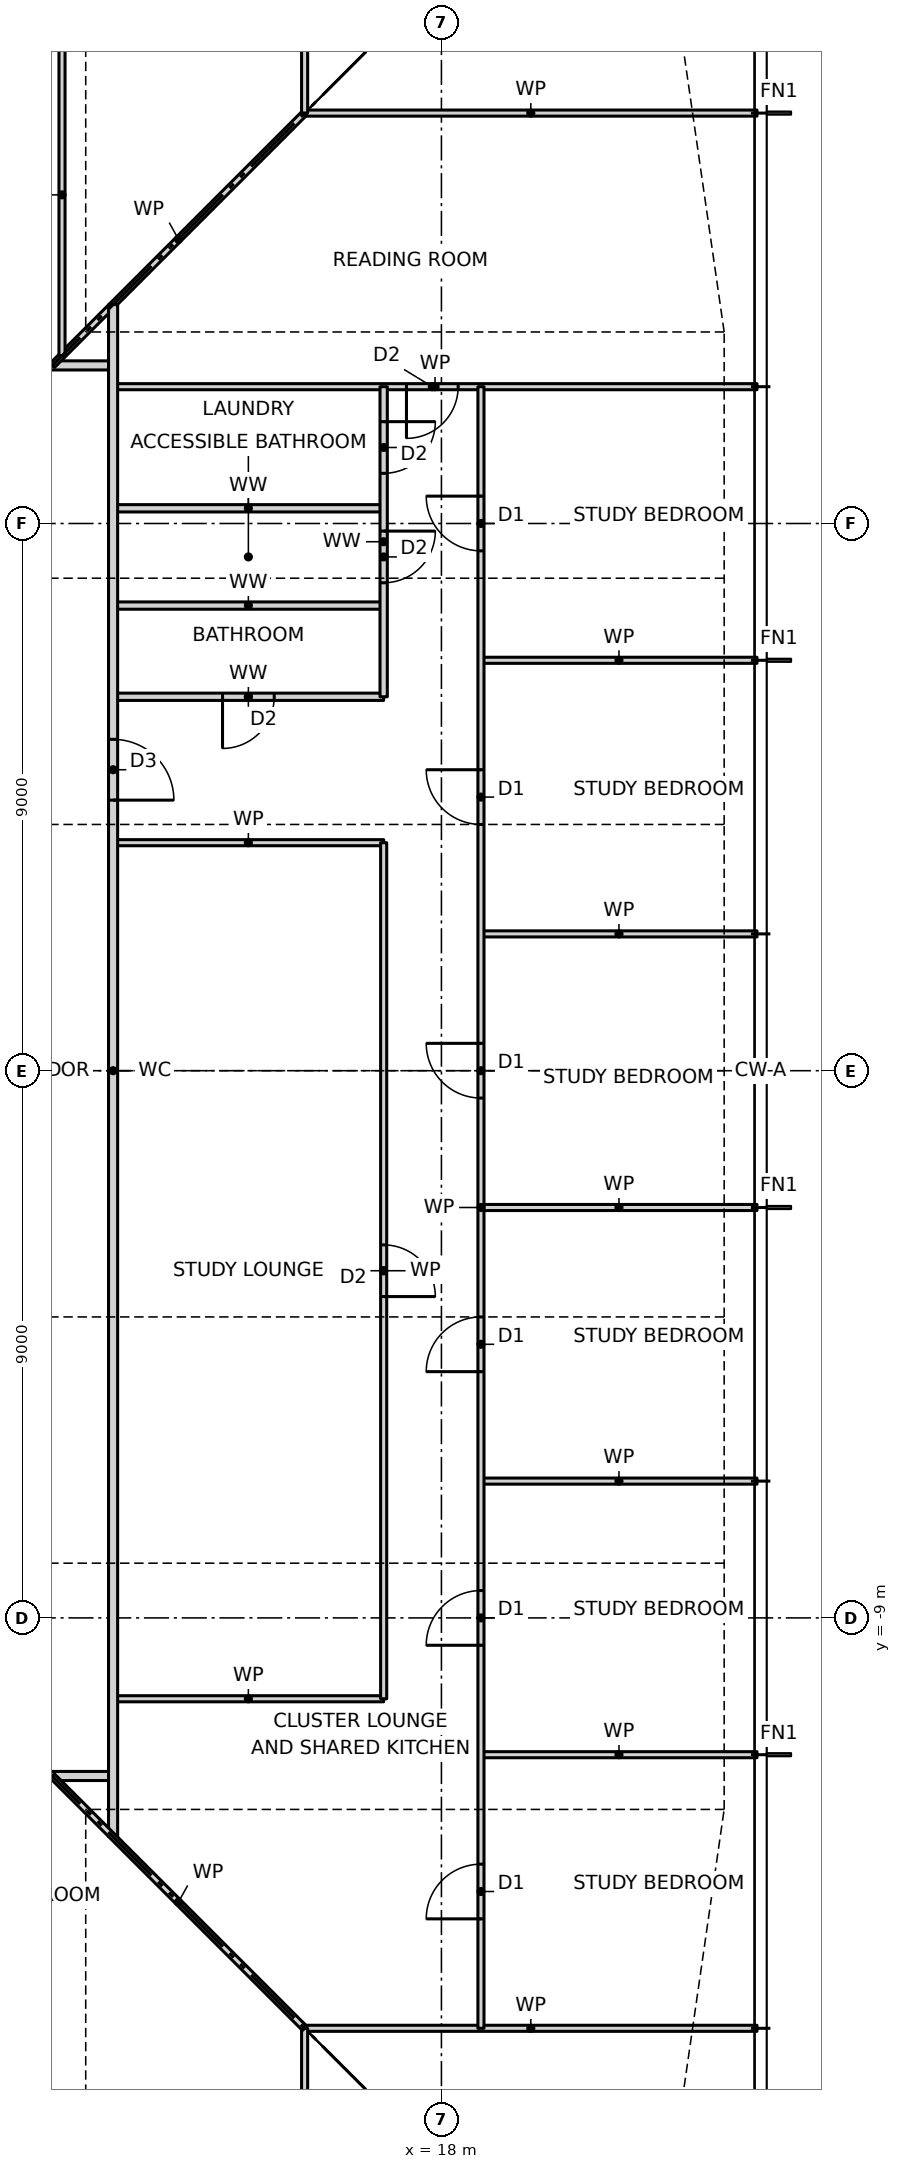
"""IFC4 building model, lengths in metres.
Left out: names, types, materials, properties, quantities, classifications, styles, units other than length and angle.
Written with IfcOpenShell. Run it as: python <this file> out.ifc"""

import sys

from ifc_helpers import new_model, si_unit, direction, frame, frame_2d, origin, place, context, subcontext, project, spatial, rectangle, extrude, element, fill, save


model = new_model("IFC4")
c1 = context("Model", 3, precision=1e-05, world=origin(), true_north=direction((0.0, 1.0)))
c2 = subcontext(c1, "Body", "Model", "MODEL_VIEW")
j1 = project(units=[si_unit("LENGTHUNIT", "METRE"), si_unit("PLANEANGLEUNIT", "RADIAN")], contexts=[c1])
p1 = place(None, origin())
s1 = spatial("IfcSite", under=j1, at=p1, CompositionType="ELEMENT")
p2 = place(p1, origin())
s2 = spatial("IfcBuilding", under=s1, at=p2, CompositionType="ELEMENT")
p3 = place(p2, frame((0.0, 0.0, 71.0)))
s3 = spatial("IfcBuildingStorey", under=s2, at=p3, CompositionType="ELEMENT", Elevation=71.0)
p4 = place(p3, frame((15.75, -15.75, 0.0), z_axis=(0.0, 0.0, 1.0), x_axis=(1.0, 0.0, 0.0)))
e1 = element("IfcWall", 1, at=p4, inside=s3, PredefinedType="PARTITIONING", context=c2, shape_type="SweptSolid", body=[
    extrude(rectangle(XDim=7.44, YDim=0.1, at=frame_2d((3.72, 0.0))), origin(), (0.0, 0.0, 1.0), 3.2),
])
p5 = place(p3, frame((-11.6, -11.6, 0.0), z_axis=(0.0, 0.0, 1.0), x_axis=(1.0, 0.0, 0.0)))
e2 = element("IfcWall", 2, at=p5, inside=s3, PredefinedType="PARTITIONING", context=c2, shape_type="SweptSolid", body=[
    extrude(rectangle(XDim=24.2, YDim=0.15, at=frame_2d((12.1, 0.0))), origin(), (0.0, 0.0, 1.0), 3.2),
])
p6 = place(p5, frame((0.74, 0.0, 0.0)))
e3 = element("IfcOpeningElement", 3, at=p6, cuts=e2, PredefinedType="OPENING", context=c2, shape_type="SweptSolid", body=[
    extrude(rectangle(XDim=1.0, YDim=2.1, at=frame_2d((0.5, 1.05))), frame((0.0, 0.085, 0.0), z_axis=(0.0, -1.0, 0.0), x_axis=(1.0, 0.0, 0.0)), (0.0, 0.0, 1.0), 0.17),
])
p7 = place(p5, frame((21.025, 0.0, 0.0)))
e4 = element("IfcOpeningElement", 4, at=p7, cuts=e2, PredefinedType="OPENING", context=c2, shape_type="SweptSolid", body=[
    extrude(rectangle(XDim=1.0, YDim=2.1, at=frame_2d((0.5, 1.05))), frame((0.0, 0.085, 0.0), z_axis=(0.0, -1.0, 0.0), x_axis=(1.0, 0.0, 0.0)), (0.0, 0.0, 1.0), 0.17),
])
p8 = place(p3, frame((18.65, -11.25, 0.0), z_axis=(0.0, 0.0, 1.0), x_axis=(1.0, 0.0, 0.0)))
e5 = element("IfcWall", 5, at=p8, inside=s3, PredefinedType="PARTITIONING", context=c2, shape_type="SweptSolid", body=[
    extrude(rectangle(XDim=4.54, YDim=0.1, at=frame_2d((2.27, 0.0))), origin(), (0.0, 0.0, 1.0), 3.2),
])
p9 = place(p3, frame((12.6, -10.33, 0.0), z_axis=(0.0, 0.0, 1.0), x_axis=(1.0, 0.0, 0.0)))
e6 = element("IfcWall", 6, at=p9, inside=s3, PredefinedType="PARTITIONING", context=c2, shape_type="SweptSolid", body=[
    extrude(rectangle(XDim=4.45, YDim=0.1, at=frame_2d((2.225, 0.0))), origin(), (0.0, 0.0, 1.0), 3.2),
])
for number, where, z_axis, x_axis in (
    (7, (18.65, -6.75, 0.0), (0.0, 0.0, 1.0), (1.0, 0.0, 0.0)),
    (8, (18.65, -2.25, 0.0), (0.0, 0.0, 1.0), (1.0, 0.0, 0.0)),
    (9, (18.65, 2.25, 0.0), (0.0, 0.0, 1.0), (1.0, 0.0, 0.0)),
):
    element("IfcWall", number, at=place(p3, frame(where, z_axis=z_axis, x_axis=x_axis)), inside=s3, PredefinedType="PARTITIONING", context=c2, shape_type="SweptSolid", body=[
        extrude(rectangle(XDim=4.54, YDim=0.1, at=frame_2d((2.27, 0.0))), origin(), (0.0, 0.0, 1.0), 3.2),
    ])
p10 = place(p3, frame((12.6, 3.75, 0.0), z_axis=(0.0, 0.0, 1.0), x_axis=(1.0, 0.0, 0.0)))
e10 = element("IfcWall", 10, at=p10, inside=s3, PredefinedType="PARTITIONING", context=c2, shape_type="SweptSolid", body=[
    extrude(rectangle(XDim=4.45, YDim=0.1, at=frame_2d((2.225, 0.0))), origin(), (0.0, 0.0, 1.0), 3.2),
])
p11 = place(p3, frame((12.6, 6.15, 0.0), z_axis=(0.0, 0.0, 1.0), x_axis=(1.0, 0.0, 0.0)))
e11 = element("IfcWall", 11, at=p11, inside=s3, PredefinedType="PARTITIONING", context=c2, shape_type="SweptSolid", body=[
    extrude(rectangle(XDim=4.45, YDim=0.12, at=frame_2d((2.225, 0.0))), origin(), (0.0, 0.0, 1.0), 3.2),
])
p12 = place(p11, frame((1.8, 0.0, 0.0)))
e12 = element("IfcOpeningElement", 12, at=p12, cuts=e11, PredefinedType="OPENING", context=c2, shape_type="SweptSolid", body=[
    extrude(rectangle(XDim=0.85, YDim=2.1, at=frame_2d((0.425, 1.05))), frame((0.0, 0.07, 0.0), z_axis=(0.0, -1.0, 0.0), x_axis=(1.0, 0.0, 0.0)), (0.0, 0.0, 1.0), 0.14),
])
p13 = place(p3, frame((18.65, 6.75, 0.0), z_axis=(0.0, 0.0, 1.0), x_axis=(1.0, 0.0, 0.0)))
e13 = element("IfcWall", 13, at=p13, inside=s3, PredefinedType="PARTITIONING", context=c2, shape_type="SweptSolid", body=[
    extrude(rectangle(XDim=4.54, YDim=0.1, at=frame_2d((2.27, 0.0))), origin(), (0.0, 0.0, 1.0), 3.2),
])
for number, where, z_axis, x_axis in (
    (14, (12.6, 7.65, 0.0), (0.0, 0.0, 1.0), (1.0, 0.0, 0.0)),
    (15, (12.6, 9.25, 0.0), (0.0, 0.0, 1.0), (1.0, 0.0, 0.0)),
):
    element("IfcWall", number, at=place(p3, frame(where, z_axis=z_axis, x_axis=x_axis)), inside=s3, PredefinedType="PARTITIONING", context=c2, shape_type="SweptSolid", body=[
        extrude(rectangle(XDim=4.45, YDim=0.12, at=frame_2d((2.225, 0.0))), origin(), (0.0, 0.0, 1.0), 3.2),
    ])
p14 = place(p3, frame((12.6, 11.25, 0.0), z_axis=(0.0, 0.0, 1.0), x_axis=(1.0, 0.0, 0.0)))
e16 = element("IfcWall", 16, at=p14, inside=s3, PredefinedType="PARTITIONING", context=c2, shape_type="SweptSolid", body=[
    extrude(rectangle(XDim=10.59, YDim=0.1, at=frame_2d((5.295, 0.0))), origin(), (0.0, 0.0, 1.0), 3.2),
])
p15 = place(p14, frame((4.825, 0.0, 0.0)))
e17 = element("IfcOpeningElement", 17, at=p15, cuts=e16, PredefinedType="OPENING", context=c2, shape_type="SweptSolid", body=[
    extrude(rectangle(XDim=0.85, YDim=2.1, at=frame_2d((0.425, 1.05))), frame((0.0, 0.06, 0.0), z_axis=(0.0, -1.0, 0.0), x_axis=(1.0, 0.0, 0.0)), (0.0, 0.0, 1.0), 0.12),
])
p16 = place(p3, frame((-11.6, 11.6, 0.0), z_axis=(0.0, 0.0, 1.0), x_axis=(1.0, 0.0, 0.0)))
e18 = element("IfcWall", 18, at=p16, inside=s3, PredefinedType="PARTITIONING", context=c2, shape_type="SweptSolid", body=[
    extrude(rectangle(XDim=24.2, YDim=0.15, at=frame_2d((12.1, 0.0))), origin(), (0.0, 0.0, 1.0), 3.2),
])
p17 = place(p16, frame((6.15, 0.0, 0.0)))
e19 = element("IfcOpeningElement", 19, at=p17, cuts=e18, PredefinedType="OPENING", context=c2, shape_type="SweptSolid", body=[
    extrude(rectangle(XDim=1.0, YDim=2.1, at=frame_2d((0.5, 1.05))), frame((0.0, 0.085, 0.0), z_axis=(0.0, -1.0, 0.0), x_axis=(1.0, 0.0, 0.0)), (0.0, 0.0, 1.0), 0.17),
])
p18 = place(p3, frame((15.75, 15.75, 0.0), z_axis=(0.0, 0.0, 1.0), x_axis=(1.0, 0.0, 0.0)))
e20 = element("IfcWall", 20, at=p18, inside=s3, PredefinedType="PARTITIONING", context=c2, shape_type="SweptSolid", body=[
    extrude(rectangle(XDim=7.44, YDim=0.1, at=frame_2d((3.72, 0.0))), origin(), (0.0, 0.0, 1.0), 3.2),
])
p19 = place(p3, frame((11.6, 11.6, 0.0), z_axis=(0.0, 0.0, 1.0), x_axis=(0.707106781187, 0.707106781187, 0.0)))
e21 = element("IfcWall", 21, at=p19, inside=s3, PredefinedType="PARTITIONING", context=c2, shape_type="SweptSolid", body=[
    extrude(rectangle(XDim=5.869, YDim=0.1, at=frame_2d((2.935, 0.0))), origin(), (0.0, 0.0, 1.0), 3.2),
])
p20 = place(p3, frame((18.65, -15.75, 0.0), z_axis=(0.0, 0.0, 1.0), x_axis=(0.0, 1.0, 0.0)))
e22 = element("IfcWall", 22, at=p20, inside=s3, PredefinedType="PARTITIONING", context=c2, shape_type="SweptSolid", body=[
    extrude(rectangle(XDim=27.0, YDim=0.1, at=frame_2d((13.5, 0.0))), origin(), (0.0, 0.0, 1.0), 3.2),
])
p21 = place(p20, frame((1.8, 0.0, 0.0)))
e23 = element("IfcOpeningElement", 23, at=p21, cuts=e22, PredefinedType="OPENING", context=c2, shape_type="SweptSolid", body=[
    extrude(rectangle(XDim=0.9, YDim=2.1, at=frame_2d((0.45, 1.05))), frame((0.0, 0.06, 0.0), z_axis=(0.0, -1.0, 0.0), x_axis=(1.0, 0.0, 0.0)), (0.0, 0.0, 1.0), 0.12),
])
p22 = place(p20, frame((6.3, 0.0, 0.0)))
e24 = element("IfcOpeningElement", 24, at=p22, cuts=e22, PredefinedType="OPENING", context=c2, shape_type="SweptSolid", body=[
    extrude(rectangle(XDim=0.9, YDim=2.1, at=frame_2d((0.45, 1.05))), frame((0.0, 0.06, 0.0), z_axis=(0.0, -1.0, 0.0), x_axis=(1.0, 0.0, 0.0)), (0.0, 0.0, 1.0), 0.12),
])
p23 = place(p20, frame((10.8, 0.0, 0.0)))
e25 = element("IfcOpeningElement", 25, at=p23, cuts=e22, PredefinedType="OPENING", context=c2, shape_type="SweptSolid", body=[
    extrude(rectangle(XDim=0.9, YDim=2.1, at=frame_2d((0.45, 1.05))), frame((0.0, 0.06, 0.0), z_axis=(0.0, -1.0, 0.0), x_axis=(1.0, 0.0, 0.0)), (0.0, 0.0, 1.0), 0.12),
])
p24 = place(p20, frame((15.3, 0.0, 0.0)))
e26 = element("IfcOpeningElement", 26, at=p24, cuts=e22, PredefinedType="OPENING", context=c2, shape_type="SweptSolid", body=[
    extrude(rectangle(XDim=0.9, YDim=2.1, at=frame_2d((0.45, 1.05))), frame((0.0, 0.06, 0.0), z_axis=(0.0, -1.0, 0.0), x_axis=(1.0, 0.0, 0.0)), (0.0, 0.0, 1.0), 0.12),
])
p25 = place(p20, frame((19.8, 0.0, 0.0)))
e27 = element("IfcOpeningElement", 27, at=p25, cuts=e22, PredefinedType="OPENING", context=c2, shape_type="SweptSolid", body=[
    extrude(rectangle(XDim=0.9, YDim=2.1, at=frame_2d((0.45, 1.05))), frame((0.0, 0.06, 0.0), z_axis=(0.0, -1.0, 0.0), x_axis=(1.0, 0.0, 0.0)), (0.0, 0.0, 1.0), 0.12),
])
p26 = place(p20, frame((24.3, 0.0, 0.0)))
e28 = element("IfcOpeningElement", 28, at=p26, cuts=e22, PredefinedType="OPENING", context=c2, shape_type="SweptSolid", body=[
    extrude(rectangle(XDim=0.9, YDim=2.1, at=frame_2d((0.45, 1.05))), frame((0.0, 0.06, 0.0), z_axis=(0.0, -1.0, 0.0), x_axis=(1.0, 0.0, 0.0)), (0.0, 0.0, 1.0), 0.12),
])
p27 = place(p3, frame((17.05, -10.33, 0.0), z_axis=(0.0, 0.0, 1.0), x_axis=(0.0, 1.0, 0.0)))
e29 = element("IfcWall", 29, at=p27, inside=s3, PredefinedType="PARTITIONING", context=c2, shape_type="SweptSolid", body=[
    extrude(rectangle(XDim=14.08, YDim=0.1, at=frame_2d((7.04, 0.0))), origin(), (0.0, 0.0, 1.0), 3.2),
])
p28 = place(p27, frame((6.615, 0.0, 0.0)))
e30 = element("IfcOpeningElement", 30, at=p28, cuts=e29, PredefinedType="OPENING", context=c2, shape_type="SweptSolid", body=[
    extrude(rectangle(XDim=0.85, YDim=2.1, at=frame_2d((0.425, 1.05))), frame((0.0, 0.06, 0.0), z_axis=(0.0, -1.0, 0.0), x_axis=(1.0, 0.0, 0.0)), (0.0, 0.0, 1.0), 0.12),
])
p29 = place(p3, frame((17.05, 6.15, 0.0), z_axis=(0.0, 0.0, 1.0), x_axis=(0.0, 1.0, 0.0)))
e31 = element("IfcWall", 31, at=p29, inside=s3, PredefinedType="PARTITIONING", context=c2, shape_type="SweptSolid", body=[
    extrude(rectangle(XDim=5.1, YDim=0.12, at=frame_2d((2.55, 0.0))), origin(), (0.0, 0.0, 1.0), 3.2),
])
p30 = place(p29, frame((1.875, 0.0, 0.0)))
e32 = element("IfcOpeningElement", 32, at=p30, cuts=e31, PredefinedType="OPENING", context=c2, shape_type="SweptSolid", body=[
    extrude(rectangle(XDim=0.85, YDim=2.1, at=frame_2d((0.425, 1.05))), frame((0.0, 0.07, 0.0), z_axis=(0.0, -1.0, 0.0), x_axis=(1.0, 0.0, 0.0)), (0.0, 0.0, 1.0), 0.14),
])
p31 = place(p29, frame((3.675, 0.0, 0.0)))
e33 = element("IfcOpeningElement", 33, at=p31, cuts=e31, PredefinedType="OPENING", context=c2, shape_type="SweptSolid", body=[
    extrude(rectangle(XDim=0.85, YDim=2.1, at=frame_2d((0.425, 1.05))), frame((0.0, 0.07, 0.0), z_axis=(0.0, -1.0, 0.0), x_axis=(1.0, 0.0, 0.0)), (0.0, 0.0, 1.0), 0.14),
])
p32 = place(p3, frame((15.75, -23.19, 0.0), z_axis=(0.0, 0.0, 1.0), x_axis=(0.0, 1.0, 0.0)))
e34 = element("IfcWall", 34, at=p32, inside=s3, PredefinedType="PARTITIONING", context=c2, shape_type="SweptSolid", body=[
    extrude(rectangle(XDim=7.44, YDim=0.1, at=frame_2d((3.72, 0.0))), origin(), (0.0, 0.0, 1.0), 3.2),
])
p33 = place(p32, frame((4.915, 0.0, 0.0)))
e35 = element("IfcOpeningElement", 35, at=p33, cuts=e34, PredefinedType="OPENING", context=c2, shape_type="SweptSolid", body=[
    extrude(rectangle(XDim=0.85, YDim=2.1, at=frame_2d((0.425, 1.05))), frame((0.0, 0.06, 0.0), z_axis=(0.0, -1.0, 0.0), x_axis=(1.0, 0.0, 0.0)), (0.0, 0.0, 1.0), 0.12),
])
p34 = place(p3, frame((15.75, 15.75, 0.0), z_axis=(0.0, 0.0, 1.0), x_axis=(0.0, 1.0, 0.0)))
e36 = element("IfcWall", 36, at=p34, inside=s3, PredefinedType="PARTITIONING", context=c2, shape_type="SweptSolid", body=[
    extrude(rectangle(XDim=7.44, YDim=0.1, at=frame_2d((3.72, 0.0))), origin(), (0.0, 0.0, 1.0), 3.2),
])
p35 = place(p34, frame((1.675, 0.0, 0.0)))
e37 = element("IfcOpeningElement", 37, at=p35, cuts=e36, PredefinedType="OPENING", context=c2, shape_type="SweptSolid", body=[
    extrude(rectangle(XDim=0.85, YDim=2.1, at=frame_2d((0.425, 1.05))), frame((0.0, 0.06, 0.0), z_axis=(0.0, -1.0, 0.0), x_axis=(1.0, 0.0, 0.0)), (0.0, 0.0, 1.0), 0.12),
])
p36 = place(p3, frame((12.6, -12.6, 0.0), z_axis=(0.0, 0.0, 1.0), x_axis=(0.0, 1.0, 0.0)))
e38 = element("IfcWall", 38, at=p36, inside=s3, PredefinedType="PARTITIONING", context=c2, shape_type="SweptSolid", body=[
    extrude(rectangle(XDim=25.2, YDim=0.15, at=frame_2d((12.6, 0.0))), origin(), (0.0, 0.0, 1.0), 3.2),
])
p37 = place(p36, frame((17.05, 0.0, 0.0)))
e39 = element("IfcOpeningElement", 39, at=p37, cuts=e38, PredefinedType="OPENING", context=c2, shape_type="SweptSolid", body=[
    extrude(rectangle(XDim=1.0, YDim=2.1, at=frame_2d((0.5, 1.05))), frame((0.0, 0.085, 0.0), z_axis=(0.0, -1.0, 0.0), x_axis=(1.0, 0.0, 0.0)), (0.0, 0.0, 1.0), 0.17),
])
p38 = place(p3, frame((11.76, 11.76, 0.0), z_axis=(0.0, 0.0, 1.0), x_axis=(0.0, 1.0, 0.0)))
e40 = element("IfcWall", 40, at=p38, inside=s3, PredefinedType="PARTITIONING", context=c2, shape_type="SweptSolid", body=[
    extrude(rectangle(XDim=5.29, YDim=0.1, at=frame_2d((2.645, 0.0))), origin(), (0.0, 0.0, 1.0), 3.2),
])
p39 = place(p3, frame((15.75, -15.75, 0.0), z_axis=(0.0, 0.0, 1.0), x_axis=(-0.707106781187, 0.707106781187, 0.0)))
e41 = element("IfcWall", 41, at=p39, inside=s3, PredefinedType="PARTITIONING", context=c2, shape_type="SweptSolid", body=[
    extrude(rectangle(XDim=5.869, YDim=0.1, at=frame_2d((2.935, 0.0))), origin(), (0.0, 0.0, 1.0), 3.2),
])
p40 = place(p21, origin())
e42 = element("IfcDoor", 42, at=p40, inside=s3, OperationType="SINGLE_SWING_LEFT", PredefinedType="DOOR", context=c2, shape_type="SweptSolid", body=[
    extrude(rectangle(XDim=0.9, YDim=2.1, at=frame_2d((0.45, 1.05))), frame((0.0, 0.025, 0.0), z_axis=(0.0, -1.0, 0.0), x_axis=(1.0, 0.0, 0.0)), (0.0, 0.0, 1.0), 0.05),
])
fill(e23, e42)
p41 = place(p22, origin())
e43 = element("IfcDoor", 43, at=p41, inside=s3, OperationType="SINGLE_SWING_LEFT", PredefinedType="DOOR", context=c2, shape_type="SweptSolid", body=[
    extrude(rectangle(XDim=0.9, YDim=2.1, at=frame_2d((0.45, 1.05))), frame((0.0, 0.025, 0.0), z_axis=(0.0, -1.0, 0.0), x_axis=(1.0, 0.0, 0.0)), (0.0, 0.0, 1.0), 0.05),
])
fill(e24, e43)
p42 = place(p23, origin())
e44 = element("IfcDoor", 44, at=p42, inside=s3, OperationType="SINGLE_SWING_LEFT", PredefinedType="DOOR", context=c2, shape_type="SweptSolid", body=[
    extrude(rectangle(XDim=0.9, YDim=2.1, at=frame_2d((0.45, 1.05))), frame((0.0, 0.025, 0.0), z_axis=(0.0, -1.0, 0.0), x_axis=(1.0, 0.0, 0.0)), (0.0, 0.0, 1.0), 0.05),
])
fill(e25, e44)
p43 = place(p24, origin())
e45 = element("IfcDoor", 45, at=p43, inside=s3, OperationType="SINGLE_SWING_RIGHT", PredefinedType="DOOR", context=c2, shape_type="SweptSolid", body=[
    extrude(rectangle(XDim=0.9, YDim=2.1, at=frame_2d((0.45, 1.05))), frame((0.0, 0.025, 0.0), z_axis=(0.0, -1.0, 0.0), x_axis=(1.0, 0.0, 0.0)), (0.0, 0.0, 1.0), 0.05),
])
fill(e26, e45)
p44 = place(p25, origin())
e46 = element("IfcDoor", 46, at=p44, inside=s3, OperationType="SINGLE_SWING_RIGHT", PredefinedType="DOOR", context=c2, shape_type="SweptSolid", body=[
    extrude(rectangle(XDim=0.9, YDim=2.1, at=frame_2d((0.45, 1.05))), frame((0.0, 0.025, 0.0), z_axis=(0.0, -1.0, 0.0), x_axis=(1.0, 0.0, 0.0)), (0.0, 0.0, 1.0), 0.05),
])
fill(e27, e46)
p45 = place(p26, origin())
e47 = element("IfcDoor", 47, at=p45, inside=s3, OperationType="SINGLE_SWING_RIGHT", PredefinedType="DOOR", context=c2, shape_type="SweptSolid", body=[
    extrude(rectangle(XDim=0.9, YDim=2.1, at=frame_2d((0.45, 1.05))), frame((0.0, 0.025, 0.0), z_axis=(0.0, -1.0, 0.0), x_axis=(1.0, 0.0, 0.0)), (0.0, 0.0, 1.0), 0.05),
])
fill(e28, e47)
p46 = place(p37, frame((1.0, 0.0, 0.0), z_axis=(0.0, 0.0, 1.0), x_axis=(-1.0, 0.0, 0.0)))
e48 = element("IfcDoor", 48, at=p46, inside=s3, OperationType="SINGLE_SWING_RIGHT", PredefinedType="DOOR", context=c2, shape_type="SweptSolid", body=[
    extrude(rectangle(XDim=1.0, YDim=2.1, at=frame_2d((0.5, 1.05))), frame((0.0, 0.025, 0.0), z_axis=(0.0, -1.0, 0.0), x_axis=(1.0, 0.0, 0.0)), (0.0, 0.0, 1.0), 0.05),
])
fill(e39, e48)
p47 = place(p28, frame((0.85, 0.0, 0.0), z_axis=(0.0, 0.0, 1.0), x_axis=(-1.0, 0.0, 0.0)))
e49 = element("IfcDoor", 49, at=p47, inside=s3, OperationType="SINGLE_SWING_RIGHT", PredefinedType="DOOR", context=c2, shape_type="SweptSolid", body=[
    extrude(rectangle(XDim=0.85, YDim=2.1, at=frame_2d((0.425, 1.05))), frame((0.0, 0.025, 0.0), z_axis=(0.0, -1.0, 0.0), x_axis=(1.0, 0.0, 0.0)), (0.0, 0.0, 1.0), 0.05),
])
fill(e30, e49)
p48 = place(p12, frame((0.85, 0.0, 0.0), z_axis=(0.0, 0.0, 1.0), x_axis=(-1.0, 0.0, 0.0)))
e50 = element("IfcDoor", 50, at=p48, inside=s3, OperationType="SINGLE_SWING_RIGHT", PredefinedType="DOOR", context=c2, shape_type="SweptSolid", body=[
    extrude(rectangle(XDim=0.85, YDim=2.1, at=frame_2d((0.425, 1.05))), frame((0.0, 0.025, 0.0), z_axis=(0.0, -1.0, 0.0), x_axis=(1.0, 0.0, 0.0)), (0.0, 0.0, 1.0), 0.05),
])
fill(e12, e50)
p49 = place(p30, frame((0.85, 0.0, 0.0), z_axis=(0.0, 0.0, 1.0), x_axis=(-1.0, 0.0, 0.0)))
e51 = element("IfcDoor", 51, at=p49, inside=s3, OperationType="SINGLE_SWING_LEFT", PredefinedType="DOOR", context=c2, shape_type="SweptSolid", body=[
    extrude(rectangle(XDim=0.85, YDim=2.1, at=frame_2d((0.425, 1.05))), frame((0.0, 0.025, 0.0), z_axis=(0.0, -1.0, 0.0), x_axis=(1.0, 0.0, 0.0)), (0.0, 0.0, 1.0), 0.05),
])
fill(e32, e51)
p50 = place(p31, frame((0.85, 0.0, 0.0), z_axis=(0.0, 0.0, 1.0), x_axis=(-1.0, 0.0, 0.0)))
e52 = element("IfcDoor", 52, at=p50, inside=s3, OperationType="SINGLE_SWING_LEFT", PredefinedType="DOOR", context=c2, shape_type="SweptSolid", body=[
    extrude(rectangle(XDim=0.85, YDim=2.1, at=frame_2d((0.425, 1.05))), frame((0.0, 0.025, 0.0), z_axis=(0.0, -1.0, 0.0), x_axis=(1.0, 0.0, 0.0)), (0.0, 0.0, 1.0), 0.05),
])
fill(e33, e52)
p51 = place(p15, frame((0.85, 0.0, 0.0), z_axis=(0.0, 0.0, 1.0), x_axis=(-1.0, 0.0, 0.0)))
e53 = element("IfcDoor", 53, at=p51, inside=s3, OperationType="SINGLE_SWING_RIGHT", PredefinedType="DOOR", context=c2, shape_type="SweptSolid", body=[
    extrude(rectangle(XDim=0.85, YDim=2.1, at=frame_2d((0.425, 1.05))), frame((0.0, 0.025, 0.0), z_axis=(0.0, -1.0, 0.0), x_axis=(1.0, 0.0, 0.0)), (0.0, 0.0, 1.0), 0.05),
])
fill(e17, e53)
save(model, sys.argv[1])
